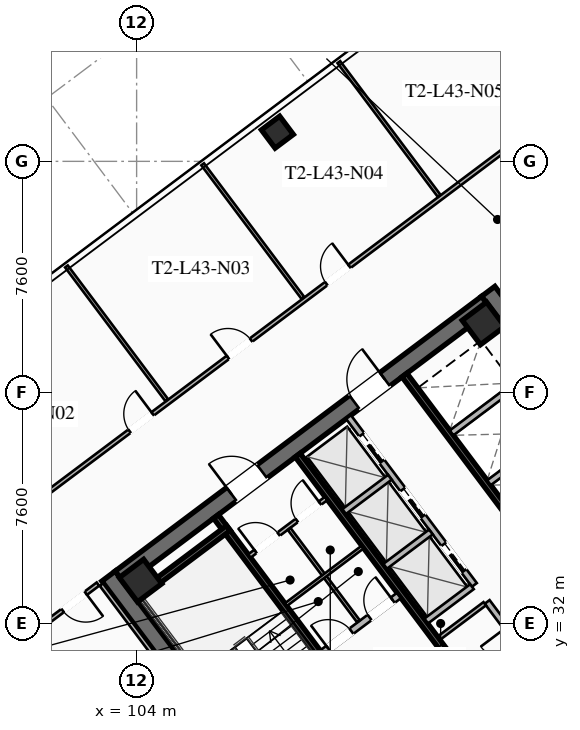
"""IFC4 building model, lengths in metres.
Left out: names, types, materials, properties, quantities, classifications, styles, units other than length and angle.
Written with IfcOpenShell. Run it as: python <this file> out.ifc"""

import sys

from ifc_helpers import new_model, si_unit, direction, frame, frame_2d, origin, origin_2d, place, context, subcontext, project, spatial, rectangle, hollow_rectangle, extrude, element, fill, save


model = new_model("IFC4")
c1 = context("Model", 3, precision=1e-05, world=origin(), true_north=direction((0.0, 1.0)))
c2 = subcontext(c1, "Body", "Model", "MODEL_VIEW")
j1 = project(units=[si_unit("LENGTHUNIT", "METRE"), si_unit("PLANEANGLEUNIT", "RADIAN")], contexts=[c1])
p1 = place(None, origin())
s1 = spatial("IfcSite", under=j1, at=p1, CompositionType="ELEMENT")
p2 = place(p1, origin())
s2 = spatial("IfcBuilding", under=s1, at=p2, CompositionType="ELEMENT")
p3 = place(p2, frame((0.0, 0.0, 160.55)))
s3 = spatial("IfcBuildingStorey", under=s2, at=p3, CompositionType="ELEMENT", Elevation=160.55)
for number, where, z_axis, x_axis in (
    (1, (112.436, 21.077, 0.0), (0.0, 0.0, 1.0), (-0.6, 0.8, 0.0)),
    (2, (115.564, 42.923, 0.0), (0.0, 0.0, 1.0), (0.6, -0.8, 0.0)),
):
    element("IfcWall", number, at=place(p3, frame(where, z_axis=z_axis, x_axis=x_axis)), inside=s3, PredefinedType="SHEAR", context=c2, shape_type="SweptSolid", body=[
        extrude(rectangle(XDim=15.6, YDim=0.55, at=frame_2d((7.8, 0.0))), origin(), (0.0, 0.0, 1.0), 3.55),
    ])
p4 = place(p3, frame((103.461, 33.502, 0.0), z_axis=(0.0, 0.0, 1.0), x_axis=(0.799998054672, 0.600002593761, 0.0)))
e3 = element("IfcWall", 3, at=p4, inside=s3, PredefinedType="SHEAR", context=c2, shape_type="SweptSolid", body=[
    extrude(rectangle(XDim=15.06, YDim=0.55, at=frame_2d((7.53, 0.0))), origin(), (0.0, 0.0, 1.0), 3.55),
])
p5 = place(p4, frame((4.58, 0.0, 0.0)))
e4 = element("IfcOpeningElement", 4, at=p5, cuts=e3, PredefinedType="OPENING", context=c2, shape_type="SweptSolid", body=[
    extrude(rectangle(XDim=1.25, YDim=2.25, at=frame_2d((0.625, 1.125))), frame((0.0, 0.285, 0.0), z_axis=(0.0, -1.0, 0.0), x_axis=(1.0, 0.0, 0.0)), (0.0, 0.0, 1.0), 0.57),
])
p6 = place(p4, frame((9.63, 0.0, 0.0)))
e5 = element("IfcOpeningElement", 5, at=p6, cuts=e3, PredefinedType="OPENING", context=c2, shape_type="SweptSolid", body=[
    extrude(rectangle(XDim=1.25, YDim=2.25, at=frame_2d((0.625, 1.125))), frame((0.0, 0.285, 0.0), z_axis=(0.0, -1.0, 0.0), x_axis=(1.0, 0.0, 0.0)), (0.0, 0.0, 1.0), 0.57),
])
for number, where, z_axis, x_axis in (
    (6, (115.41, 41.87, 0.0), (0.0, 0.0, 1.0), (0.8, 0.6, 0.0)),
    (7, (104.13, 33.41, 0.0), (0.0, 0.0, 1.0), (0.8, 0.6, 0.0)),
):
    element("IfcColumn", number, at=place(p3, frame(where, z_axis=z_axis, x_axis=x_axis)), inside=s3, PredefinedType="COLUMN", context=c2, shape_type="SweptSolid", body=[
        extrude(hollow_rectangle(XDim=1.0, YDim=1.0, WallThickness=0.04, at=origin_2d()), origin(), (0.0, 0.0, 1.0), 3.37),
    ])
p7 = place(p3, frame((108.63, 48.16, 0.0), z_axis=(0.0, 0.0, 1.0), x_axis=(0.799999996291, 0.600000004945, 0.0)))
e8 = element("IfcColumn", 8, at=p7, inside=s3, PredefinedType="COLUMN", context=c2, shape_type="SweptSolid", body=[
    extrude(hollow_rectangle(XDim=0.75, YDim=0.75, WallThickness=0.032, at=origin_2d()), origin(), (0.0, 0.0, 1.0), 3.37),
])
p8 = place(p3, frame((111.44, 29.08, 0.0), z_axis=(0.0, 0.0, 1.0), x_axis=(-0.59999029481, 0.8000072788, 0.0)))
e9 = element("IfcWall", 9, at=p8, inside=s3, PredefinedType="SHEAR", context=c2, shape_type="SweptSolid", body=[
    extrude(rectangle(XDim=8.05, YDim=0.2, at=frame_2d((4.025, 0.0))), origin(), (0.0, 0.0, 1.0), 3.37),
])
p9 = place(p8, frame((0.45, 0.0, 0.0)))
e10 = element("IfcOpeningElement", 10, at=p9, cuts=e9, PredefinedType="OPENING", context=c2, shape_type="SweptSolid", body=[
    extrude(rectangle(XDim=1.15, YDim=2.2, at=frame_2d((0.575, 1.1))), frame((0.0, 0.11, 0.0), z_axis=(0.0, -1.0, 0.0), x_axis=(1.0, 0.0, 0.0)), (0.0, 0.0, 1.0), 0.22),
])
p10 = place(p3, frame((103.956, 32.842, 0.0), z_axis=(0.0, 0.0, 1.0), x_axis=(0.800015298837, 0.599979601008, 0.0)))
e11 = element("IfcWall", 11, at=p10, inside=s3, PredefinedType="SHEAR", context=c2, shape_type="SweptSolid", body=[
    extrude(rectangle(XDim=3.83, YDim=0.2, at=frame_2d((1.915, 0.0))), origin(), (0.0, 0.0, 1.0), 3.37),
])
p11 = place(p3, frame((117.998, 25.936, 0.0), z_axis=(0.0, 0.0, 1.0), x_axis=(-0.600002693989, 0.799997979501, 0.0)))
e12 = element("IfcWall", 12, at=p11, inside=s3, PredefinedType="SHEAR", context=c2, shape_type="SweptSolid", body=[
    extrude(rectangle(XDim=14.5, YDim=0.2, at=frame_2d((7.25, 0.0))), origin(), (0.0, 0.0, 1.0), 3.37),
])
p12 = place(p3, frame((110.104, 31.028, 0.0), z_axis=(0.0, 0.0, 1.0), x_axis=(0.800018601094, 0.59997519774, 0.0)))
e13 = element("IfcWall", 13, at=p12, inside=s3, PredefinedType="SOLIDWALL", context=c2, shape_type="SweptSolid", body=[
    extrude(rectangle(XDim=3.15, YDim=0.22, at=frame_2d((1.575, 0.0))), origin(), (0.0, 0.0, 1.0), 2.723),
])
p13 = place(p12, frame((0.25, 0.0, 0.0)))
e14 = element("IfcOpeningElement", 14, at=p13, cuts=e13, PredefinedType="OPENING", context=c2, shape_type="SweptSolid", body=[
    extrude(rectangle(XDim=0.95, YDim=2.05, at=frame_2d((0.475, 1.025))), frame((0.0, 0.12, 0.0), z_axis=(0.0, -1.0, 0.0), x_axis=(1.0, 0.0, 0.0)), (0.0, 0.0, 1.0), 0.24),
])
p14 = place(p12, frame((1.95, 0.0, 0.0)))
e15 = element("IfcOpeningElement", 15, at=p14, cuts=e13, PredefinedType="OPENING", context=c2, shape_type="SweptSolid", body=[
    extrude(rectangle(XDim=0.95, YDim=2.05, at=frame_2d((0.475, 1.025))), frame((0.0, 0.12, 0.0), z_axis=(0.0, -1.0, 0.0), x_axis=(1.0, 0.0, 0.0)), (0.0, 0.0, 1.0), 0.24),
])
p15 = place(p3, frame((112.81, 40.17, 0.0), z_axis=(0.0, 0.0, 1.0), x_axis=(0.599993943644, -0.800004542231, 0.0)))
e16 = element("IfcWall", 16, at=p15, inside=s3, PredefinedType="SHEAR", context=c2, shape_type="SweptSolid", body=[
    extrude(rectangle(XDim=6.45, YDim=0.2, at=frame_2d((3.225, 0.0))), origin(), (0.0, 0.0, 1.0), 3.37),
])
for number, where, z_axis, x_axis in (
    (17, (115.59, 36.63, 0.0), (0.0, 0.0, 1.0), (0.8, 0.6, 0.0)),
    (18, (114.36, 38.27, 0.0), (0.0, 0.0, 1.0), (0.8, 0.6, 0.0)),
):
    element("IfcWall", number, at=place(p3, frame(where, z_axis=z_axis, x_axis=x_axis)), inside=s3, PredefinedType="SOLIDWALL", context=c2, shape_type="SweptSolid", body=[
        extrude(rectangle(XDim=3.48, YDim=0.2, at=frame_2d((1.74, 0.0))), origin(), (0.0, 0.0, 1.0), 3.37),
    ])
p16 = place(p3, frame((107.71, 34.22, 0.0), z_axis=(0.0, 0.0, 1.0), x_axis=(0.799981399002, 0.60002480053, 0.0)))
e19 = element("IfcWall", 19, at=p16, inside=s3, PredefinedType="PARTITIONING", context=c2, shape_type="SweptSolid", body=[
    extrude(rectangle(XDim=3.15, YDim=0.135, at=frame_2d((1.575, 0.0))), origin(), (0.0, 0.0, 1.0), 2.723),
])
p17 = place(p16, frame((0.25, 0.0, 0.0)))
e20 = element("IfcOpeningElement", 20, at=p17, cuts=e19, PredefinedType="OPENING", context=c2, shape_type="SweptSolid", body=[
    extrude(rectangle(XDim=0.95, YDim=2.05, at=frame_2d((0.475, 1.025))), frame((0.0, 0.077, 0.0), z_axis=(0.0, -1.0, 0.0), x_axis=(1.0, 0.0, 0.0)), (0.0, 0.0, 1.0), 0.155),
])
p18 = place(p16, frame((1.95, 0.0, 0.0)))
e21 = element("IfcOpeningElement", 21, at=p18, cuts=e19, PredefinedType="OPENING", context=c2, shape_type="SweptSolid", body=[
    extrude(rectangle(XDim=0.95, YDim=2.05, at=frame_2d((0.475, 1.025))), frame((0.0, 0.077, 0.0), z_axis=(0.0, -1.0, 0.0), x_axis=(1.0, 0.0, 0.0)), (0.0, 0.0, 1.0), 0.155),
])
p19 = place(p3, frame((111.296, 32.072, 0.0), z_axis=(0.0, 0.0, 1.0), x_axis=(-0.59995887973, 0.800030838552, 0.0)))
e22 = element("IfcWall", 22, at=p19, inside=s3, PredefinedType="PARTITIONING", context=c2, shape_type="SweptSolid", body=[
    extrude(rectangle(XDim=3.8, YDim=0.11, at=frame_2d((1.9, 0.0))), origin(), (0.0, 0.0, 1.0), 2.723),
])
p20 = place(p3, frame((108.91, 32.62, 0.0), z_axis=(0.0, 0.0, 1.0), x_axis=(0.800018601094, 0.59997519774, 0.0)))
e23 = element("IfcWall", 23, at=p20, inside=s3, PredefinedType="PARTITIONING", context=c2, shape_type="SweptSolid", body=[
    extrude(rectangle(XDim=3.15, YDim=0.11, at=frame_2d((1.575, 0.0))), origin(), (0.0, 0.0, 1.0), 2.723),
])
p21 = place(p3, frame((119.67, 27.19, 0.0), z_axis=(0.0, 0.0, 1.0), x_axis=(-0.599988677396, 0.800008491828, 0.0)))
e24 = element("IfcWall", 24, at=p21, inside=s3, PredefinedType="SOLIDWALL", context=c2, shape_type="SweptSolid", body=[
    extrude(rectangle(XDim=6.9, YDim=0.2, at=frame_2d((3.45, 0.0))), origin(), (0.0, 0.0, 1.0), 2.723),
])
p22 = place(p21, frame((0.85, 0.0, 0.0)))
e25 = element("IfcOpeningElement", 25, at=p22, cuts=e24, PredefinedType="OPENING", context=c2, shape_type="SweptSolid", body=[
    extrude(rectangle(XDim=0.95, YDim=2.05, at=frame_2d((0.475, 1.025))), frame((0.0, 0.11, 0.0), z_axis=(0.0, -1.0, 0.0), x_axis=(1.0, 0.0, 0.0)), (0.0, 0.0, 1.0), 0.22),
])
p23 = place(p21, frame((4.8, 0.0, 0.0)))
e26 = element("IfcOpeningElement", 26, at=p23, cuts=e24, PredefinedType="OPENING", context=c2, shape_type="SweptSolid", body=[
    extrude(rectangle(XDim=1.05, YDim=2.2, at=frame_2d((0.525, 1.1))), frame((0.0, 0.11, 0.0), z_axis=(0.0, -1.0, 0.0), x_axis=(1.0, 0.0, 0.0)), (0.0, 0.0, 1.0), 0.22),
])
p24 = place(p3, frame((113.946, 31.522, 0.0), z_axis=(0.0, 0.0, 1.0), x_axis=(0.8, 0.6, 0.0)))
e27 = element("IfcWall", 27, at=p24, inside=s3, PredefinedType="PARTITIONING", context=c2, shape_type="SweptSolid", body=[
    extrude(rectangle(XDim=1.88, YDim=0.135, at=frame_2d((0.94, 0.0))), origin(), (0.0, 0.0, 1.0), 2.723),
])
p25 = place(p3, frame((115.11, 33.27, 0.0), z_axis=(0.0, 0.0, 1.0), x_axis=(-0.600011322243, 0.799991508192, 0.0)))
e28 = element("IfcWall", 28, at=p25, inside=s3, PredefinedType="SOLIDWALL", context=c2, shape_type="SweptSolid", body=[
    extrude(rectangle(XDim=6.9, YDim=0.2, at=frame_2d((3.45, 0.0))), origin(), (0.0, 0.0, 1.0), 3.37),
])
p26 = place(p25, frame((0.575, 0.0, 0.0)))
e29 = element("IfcOpeningElement", 29, at=p26, cuts=e28, PredefinedType="OPENING", context=c2, shape_type="SweptSolid", body=[
    extrude(rectangle(XDim=1.1, YDim=2.2, at=frame_2d((0.55, 1.1))), frame((0.0, 0.11, 0.0), z_axis=(0.0, -1.0, 0.0), x_axis=(1.0, 0.0, 0.0)), (0.0, 0.0, 1.0), 0.22),
])
p27 = place(p25, frame((2.825, 0.0, 0.0)))
e30 = element("IfcOpeningElement", 30, at=p27, cuts=e28, PredefinedType="OPENING", context=c2, shape_type="SweptSolid", body=[
    extrude(rectangle(XDim=1.1, YDim=2.2, at=frame_2d((0.55, 1.1))), frame((0.0, 0.11, 0.0), z_axis=(0.0, -1.0, 0.0), x_axis=(1.0, 0.0, 0.0)), (0.0, 0.0, 1.0), 0.22),
])
p28 = place(p25, frame((5.075, 0.0, 0.0)))
e31 = element("IfcOpeningElement", 31, at=p28, cuts=e28, PredefinedType="OPENING", context=c2, shape_type="SweptSolid", body=[
    extrude(rectangle(XDim=1.1, YDim=2.2, at=frame_2d((0.55, 1.1))), frame((0.0, 0.11, 0.0), z_axis=(0.0, -1.0, 0.0), x_axis=(1.0, 0.0, 0.0)), (0.0, 0.0, 1.0), 0.22),
])
p29 = place(p3, frame((113.526, 32.082, 0.0), z_axis=(0.0, 0.0, 1.0), x_axis=(0.800046745961, 0.599937666993, 0.0)))
e32 = element("IfcWall", 32, at=p29, inside=s3, PredefinedType="SOLIDWALL", context=c2, shape_type="SweptSolid", body=[
    extrude(rectangle(XDim=1.88, YDim=0.2, at=frame_2d((0.94, 0.0))), origin(), (0.0, 0.0, 1.0), 3.37),
])
p30 = place(p3, frame((112.176, 33.882, 0.0), z_axis=(0.0, 0.0, 1.0), x_axis=(0.8, 0.6, 0.0)))
e33 = element("IfcWall", 33, at=p30, inside=s3, PredefinedType="SOLIDWALL", context=c2, shape_type="SweptSolid", body=[
    extrude(rectangle(XDim=1.88, YDim=0.2, at=frame_2d((0.94, 0.0))), origin(), (0.0, 0.0, 1.0), 3.37),
])
p31 = place(p3, frame((110.826, 35.682, 0.0), z_axis=(0.0, 0.0, 1.0), x_axis=(0.799984418148, 0.600020775241, 0.0)))
e34 = element("IfcWall", 34, at=p31, inside=s3, PredefinedType="SOLIDWALL", context=c2, shape_type="SweptSolid", body=[
    extrude(rectangle(XDim=1.88, YDim=0.2, at=frame_2d((0.94, 0.0))), origin(), (0.0, 0.0, 1.0), 3.37),
])
p32 = place(p3, frame((95.8, 32.35, 0.0), z_axis=(0.0, 0.0, 1.0), x_axis=(0.8, 0.6, 0.0)))
e35 = element("IfcWall", 35, at=p32, inside=s3, PredefinedType="PARTITIONING", context=c2, shape_type="SweptSolid", body=[
    extrude(rectangle(XDim=28.7, YDim=0.135, at=frame_2d((14.35, 0.0))), origin(), (0.0, 0.0, 1.0), 2.723),
])
p33 = place(p32, frame((0.3, 0.0, 0.0)))
e36 = element("IfcOpeningElement", 36, at=p33, cuts=e35, PredefinedType="OPENING", context=c2, shape_type="SweptSolid", body=[
    extrude(rectangle(XDim=0.95, YDim=2.05, at=frame_2d((0.475, 1.025))), frame((0.0, 0.077, 0.0), z_axis=(0.0, -1.0, 0.0), x_axis=(1.0, 0.0, 0.0)), (0.0, 0.0, 1.0), 0.155),
])
p34 = place(p32, frame((9.959, 0.0, 0.0)))
e37 = element("IfcOpeningElement", 37, at=p34, cuts=e35, PredefinedType="OPENING", context=c2, shape_type="SweptSolid", body=[
    extrude(rectangle(XDim=0.95, YDim=2.05, at=frame_2d((0.475, 1.025))), frame((0.0, 0.077, 0.0), z_axis=(0.0, -1.0, 0.0), x_axis=(1.0, 0.0, 0.0)), (0.0, 0.0, 1.0), 0.155),
])
p35 = place(p32, frame((14.005, 0.0, 0.0)))
e38 = element("IfcOpeningElement", 38, at=p35, cuts=e35, PredefinedType="OPENING", context=c2, shape_type="SweptSolid", body=[
    extrude(rectangle(XDim=0.95, YDim=2.05, at=frame_2d((0.475, 1.025))), frame((0.0, 0.077, 0.0), z_axis=(0.0, -1.0, 0.0), x_axis=(1.0, 0.0, 0.0)), (0.0, 0.0, 1.0), 0.155),
])
p36 = place(p32, frame((18.049, 0.0, 0.0)))
e39 = element("IfcOpeningElement", 39, at=p36, cuts=e35, PredefinedType="OPENING", context=c2, shape_type="SweptSolid", body=[
    extrude(rectangle(XDim=0.95, YDim=2.05, at=frame_2d((0.475, 1.025))), frame((0.0, 0.077, 0.0), z_axis=(0.0, -1.0, 0.0), x_axis=(1.0, 0.0, 0.0)), (0.0, 0.0, 1.0), 0.155),
])
p37 = place(p32, frame((27.45, 0.0, 0.0)))
e40 = element("IfcOpeningElement", 40, at=p37, cuts=e35, PredefinedType="OPENING", context=c2, shape_type="SweptSolid", body=[
    extrude(rectangle(XDim=0.95, YDim=2.05, at=frame_2d((0.475, 1.025))), frame((0.0, 0.077, 0.0), z_axis=(0.0, -1.0, 0.0), x_axis=(1.0, 0.0, 0.0)), (0.0, 0.0, 1.0), 0.155),
])
p38 = place(p3, frame((104.992, 39.344, 0.0), z_axis=(0.0, 0.0, 1.0), x_axis=(-0.600014204577, 0.79998934637, 0.0)))
e41 = element("IfcWall", 41, at=p38, inside=s3, PredefinedType="PARTITIONING", context=c2, shape_type="SweptSolid", body=[
    extrude(rectangle(XDim=5.5, YDim=0.11, at=frame_2d((2.75, 0.0))), origin(), (0.0, 0.0, 1.0), 2.723),
])
p39 = place(p3, frame((109.472, 42.704, 0.0), z_axis=(0.0, 0.0, 1.0), x_axis=(-0.599985794856, 0.800010653661, 0.0)))
e42 = element("IfcWall", 42, at=p39, inside=s3, PredefinedType="PARTITIONING", context=c2, shape_type="SweptSolid", body=[
    extrude(rectangle(XDim=5.5, YDim=0.11, at=frame_2d((2.75, 0.0))), origin(), (0.0, 0.0, 1.0), 2.723),
])
p40 = place(p3, frame((113.952, 46.064, 0.0), z_axis=(0.0, 0.0, 1.0), x_axis=(-0.599964488045, 0.800026632735, 0.0)))
e43 = element("IfcWall", 43, at=p40, inside=s3, PredefinedType="PARTITIONING", context=c2, shape_type="SweptSolid", body=[
    extrude(rectangle(XDim=5.5, YDim=0.11, at=frame_2d((2.75, 0.0))), origin(), (0.0, 0.0, 1.0), 2.723),
])
p41 = place(p3, frame((131.282, 32.874, 0.0), z_axis=(0.0, 0.0, 1.0), x_axis=(-0.8, -0.6, 0.0)))
e44 = element("IfcWall", 44, at=p41, inside=s3, PredefinedType="PARTITIONING", context=c2, shape_type="SweptSolid", body=[
    extrude(rectangle(XDim=28.7, YDim=0.135, at=frame_2d((14.35, 0.0))), origin(), (0.0, 0.0, 1.0), 2.723),
])
p42 = place(p41, frame((27.37, 0.0, 0.0)))
e45 = element("IfcOpeningElement", 45, at=p42, cuts=e44, PredefinedType="OPENING", context=c2, shape_type="SweptSolid", body=[
    extrude(rectangle(XDim=0.95, YDim=2.05, at=frame_2d((0.475, 1.025))), frame((0.0, 0.077, 0.0), z_axis=(0.0, -1.0, 0.0), x_axis=(1.0, 0.0, 0.0)), (0.0, 0.0, 1.0), 0.155),
])
p43 = place(p41, frame((13.592, 0.0, 0.0)))
e46 = element("IfcOpeningElement", 46, at=p43, cuts=e44, PredefinedType="OPENING", context=c2, shape_type="SweptSolid", body=[
    extrude(rectangle(XDim=0.95, YDim=2.05, at=frame_2d((0.475, 1.025))), frame((0.0, 0.077, 0.0), z_axis=(0.0, -1.0, 0.0), x_axis=(1.0, 0.0, 0.0)), (0.0, 0.0, 1.0), 0.155),
])
p44 = place(p41, frame((0.38, 0.0, 0.0)))
e47 = element("IfcOpeningElement", 47, at=p44, cuts=e44, PredefinedType="OPENING", context=c2, shape_type="SweptSolid", body=[
    extrude(rectangle(XDim=0.95, YDim=2.05, at=frame_2d((0.475, 1.025))), frame((0.0, 0.077, 0.0), z_axis=(0.0, -1.0, 0.0), x_axis=(1.0, 0.0, 0.0)), (0.0, 0.0, 1.0), 0.155),
])
p45 = place(p3, frame((112.104, 20.928, 0.0), z_axis=(0.0, 0.0, 1.0), x_axis=(-0.599994940075, 0.800003794918, 0.0)))
e48 = element("IfcWall", 48, at=p45, inside=s3, PredefinedType="PARTITIONING", context=c2, shape_type="SweptSolid", body=[
    extrude(rectangle(XDim=15.44, YDim=0.135, at=frame_2d((7.72, 0.0))), origin(), (0.0, 0.0, 1.0), 2.723),
])
p46 = place(p3, frame((102.728, 33.296, 0.0), z_axis=(0.0, 0.0, 1.0), x_axis=(-0.800013722153, -0.59998170336, 0.0)))
e49 = element("IfcWall", 49, at=p46, inside=s3, PredefinedType="PARTITIONING", context=c2, shape_type="SweptSolid", body=[
    extrude(rectangle(XDim=8.54, YDim=0.135, at=frame_2d((4.27, 0.0))), origin(), (0.0, 0.0, 1.0), 2.723),
])
p47 = place(p46, frame((0.5, 0.0, 0.0)))
e50 = element("IfcOpeningElement", 50, at=p47, cuts=e49, PredefinedType="OPENING", context=c2, shape_type="SweptSolid", body=[
    extrude(rectangle(XDim=0.95, YDim=2.05, at=frame_2d((0.475, 1.025))), frame((0.0, 0.077, 0.0), z_axis=(0.0, -1.0, 0.0), x_axis=(1.0, 0.0, 0.0)), (0.0, 0.0, 1.0), 0.155),
])
p48 = place(p5, origin())
e51 = element("IfcDoor", 51, at=p48, inside=s3, OperationType="SINGLE_SWING_LEFT", PredefinedType="DOOR", context=c2, shape_type="SweptSolid", body=[
    extrude(rectangle(XDim=1.25, YDim=2.25, at=frame_2d((0.625, 1.125))), frame((0.0, 0.025, 0.0), z_axis=(0.0, -1.0, 0.0), x_axis=(1.0, 0.0, 0.0)), (0.0, 0.0, 1.0), 0.05),
])
fill(e4, e51)
p49 = place(p6, origin())
e52 = element("IfcDoor", 52, at=p49, inside=s3, OperationType="SINGLE_SWING_RIGHT", PredefinedType="DOOR", context=c2, shape_type="SweptSolid", body=[
    extrude(rectangle(XDim=1.25, YDim=2.25, at=frame_2d((0.625, 1.125))), frame((0.0, 0.025, 0.0), z_axis=(0.0, -1.0, 0.0), x_axis=(1.0, 0.0, 0.0)), (0.0, 0.0, 1.0), 0.05),
])
fill(e5, e52)
p50 = place(p17, origin())
e53 = element("IfcDoor", 53, at=p50, inside=s3, OperationType="SINGLE_SWING_LEFT", PredefinedType="DOOR", context=c2, shape_type="SweptSolid", body=[
    extrude(rectangle(XDim=0.95, YDim=2.05, at=frame_2d((0.475, 1.025))), frame((0.0, 0.025, 0.0), z_axis=(0.0, -1.0, 0.0), x_axis=(1.0, 0.0, 0.0)), (0.0, 0.0, 1.0), 0.05),
])
fill(e20, e53)
p51 = place(p18, origin())
e54 = element("IfcDoor", 54, at=p51, inside=s3, OperationType="SINGLE_SWING_RIGHT", PredefinedType="DOOR", context=c2, shape_type="SweptSolid", body=[
    extrude(rectangle(XDim=0.95, YDim=2.05, at=frame_2d((0.475, 1.025))), frame((0.0, 0.025, 0.0), z_axis=(0.0, -1.0, 0.0), x_axis=(1.0, 0.0, 0.0)), (0.0, 0.0, 1.0), 0.05),
])
fill(e21, e54)
p52 = place(p13, origin())
e55 = element("IfcDoor", 55, at=p52, inside=s3, OperationType="SINGLE_SWING_LEFT", PredefinedType="DOOR", context=c2, shape_type="SweptSolid", body=[
    extrude(rectangle(XDim=0.95, YDim=2.05, at=frame_2d((0.475, 1.025))), frame((0.0, 0.025, 0.0), z_axis=(0.0, -1.0, 0.0), x_axis=(1.0, 0.0, 0.0)), (0.0, 0.0, 1.0), 0.05),
])
fill(e14, e55)
p53 = place(p14, origin())
e56 = element("IfcDoor", 56, at=p53, inside=s3, OperationType="SINGLE_SWING_RIGHT", PredefinedType="DOOR", context=c2, shape_type="SweptSolid", body=[
    extrude(rectangle(XDim=0.95, YDim=2.05, at=frame_2d((0.475, 1.025))), frame((0.0, 0.025, 0.0), z_axis=(0.0, -1.0, 0.0), x_axis=(1.0, 0.0, 0.0)), (0.0, 0.0, 1.0), 0.05),
])
fill(e15, e56)
p54 = place(p34, origin())
e57 = element("IfcDoor", 57, at=p54, inside=s3, OperationType="SINGLE_SWING_RIGHT", PredefinedType="DOOR", context=c2, shape_type="SweptSolid", body=[
    extrude(rectangle(XDim=0.95, YDim=2.05, at=frame_2d((0.475, 1.025))), frame((0.0, 0.025, 0.0), z_axis=(0.0, -1.0, 0.0), x_axis=(1.0, 0.0, 0.0)), (0.0, 0.0, 1.0), 0.05),
])
fill(e37, e57)
p55 = place(p35, origin())
e58 = element("IfcDoor", 58, at=p55, inside=s3, OperationType="SINGLE_SWING_LEFT", PredefinedType="DOOR", context=c2, shape_type="SweptSolid", body=[
    extrude(rectangle(XDim=0.95, YDim=2.05, at=frame_2d((0.475, 1.025))), frame((0.0, 0.025, 0.0), z_axis=(0.0, -1.0, 0.0), x_axis=(1.0, 0.0, 0.0)), (0.0, 0.0, 1.0), 0.05),
])
fill(e38, e58)
p56 = place(p36, origin())
e59 = element("IfcDoor", 59, at=p56, inside=s3, OperationType="SINGLE_SWING_RIGHT", PredefinedType="DOOR", context=c2, shape_type="SweptSolid", body=[
    extrude(rectangle(XDim=0.95, YDim=2.05, at=frame_2d((0.475, 1.025))), frame((0.0, 0.025, 0.0), z_axis=(0.0, -1.0, 0.0), x_axis=(1.0, 0.0, 0.0)), (0.0, 0.0, 1.0), 0.05),
])
fill(e39, e59)
p57 = place(p47, origin())
e60 = element("IfcDoor", 60, at=p57, inside=s3, OperationType="SINGLE_SWING_LEFT", PredefinedType="DOOR", context=c2, shape_type="SweptSolid", body=[
    extrude(rectangle(XDim=0.95, YDim=2.05, at=frame_2d((0.475, 1.025))), frame((0.0, 0.025, 0.0), z_axis=(0.0, -1.0, 0.0), x_axis=(1.0, 0.0, 0.0)), (0.0, 0.0, 1.0), 0.05),
])
fill(e50, e60)
p58 = place(p26, origin())
e61 = element("IfcDoor", 61, at=p58, inside=s3, OperationType="SLIDING_TO_LEFT", PredefinedType="DOOR", context=c2, shape_type="SweptSolid", body=[
    extrude(rectangle(XDim=1.1, YDim=2.2, at=frame_2d((0.55, 1.1))), frame((0.0, 0.025, 0.0), z_axis=(0.0, -1.0, 0.0), x_axis=(1.0, 0.0, 0.0)), (0.0, 0.0, 1.0), 0.05),
])
fill(e29, e61)
p59 = place(p27, origin())
e62 = element("IfcDoor", 62, at=p59, inside=s3, OperationType="SLIDING_TO_LEFT", PredefinedType="DOOR", context=c2, shape_type="SweptSolid", body=[
    extrude(rectangle(XDim=1.1, YDim=2.2, at=frame_2d((0.55, 1.1))), frame((0.0, 0.025, 0.0), z_axis=(0.0, -1.0, 0.0), x_axis=(1.0, 0.0, 0.0)), (0.0, 0.0, 1.0), 0.05),
])
fill(e30, e62)
p60 = place(p28, origin())
e63 = element("IfcDoor", 63, at=p60, inside=s3, OperationType="SLIDING_TO_LEFT", PredefinedType="DOOR", context=c2, shape_type="SweptSolid", body=[
    extrude(rectangle(XDim=1.1, YDim=2.2, at=frame_2d((0.55, 1.1))), frame((0.0, 0.025, 0.0), z_axis=(0.0, -1.0, 0.0), x_axis=(1.0, 0.0, 0.0)), (0.0, 0.0, 1.0), 0.05),
])
fill(e31, e63)
save(model, sys.argv[1])
